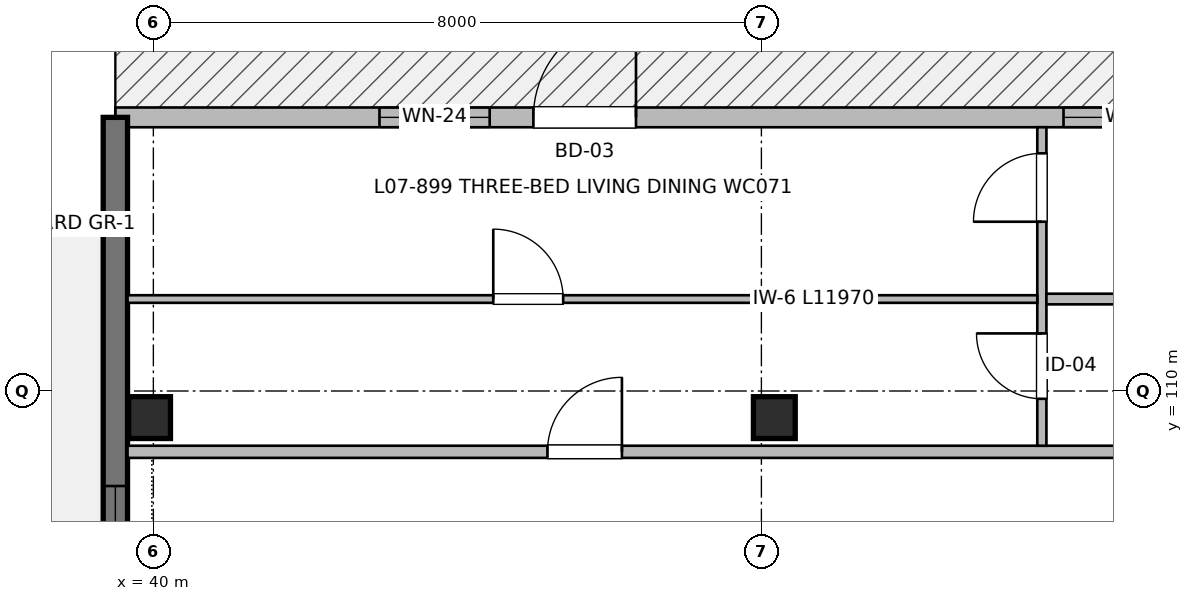
"""IFC4 building model, lengths in metres.
Left out: names, types, materials, properties, quantities, classifications, styles, units other than length and angle.
Written with IfcOpenShell. Run it as: python <this file> out.ifc"""

import sys

from ifc_helpers import new_model, si_unit, direction, frame, frame_2d, origin, origin_2d, place, context, subcontext, project, spatial, rectangle, extrude, element, fill, save


model = new_model("IFC4")
c1 = context("Model", 3, precision=1e-05, world=origin(), true_north=direction((0.0, 1.0)))
c2 = subcontext(c1, "Body", "Model", "MODEL_VIEW")
j1 = project(units=[si_unit("LENGTHUNIT", "METRE"), si_unit("PLANEANGLEUNIT", "RADIAN")], contexts=[c1])
p1 = place(None, origin())
s1 = spatial("IfcSite", under=j1, at=p1, CompositionType="ELEMENT")
p2 = place(p1, origin())
s2 = spatial("IfcBuilding", under=s1, at=p2, CompositionType="ELEMENT")
p3 = place(p2, frame((0.0, 0.0, 23.36)))
s3 = spatial("IfcBuildingStorey", under=s2, at=p3, CompositionType="ELEMENT", Elevation=23.36)
for number, where, z_axis, x_axis in (
    (1, (39.95, 109.65, 0.0), (0.0, 0.0, 1.0), (1.0, 0.0, 0.0)),
    (2, (48.17, 109.65, 0.0), (0.0, 0.0, 1.0), (1.0, 0.0, 0.0)),
):
    element("IfcColumn", number, at=place(p3, frame(where, z_axis=z_axis, x_axis=x_axis)), inside=s3, PredefinedType="COLUMN", context=c2, shape_type="SweptSolid", body=[
        extrude(rectangle(XDim=0.55, YDim=0.55, at=origin_2d()), origin(), (0.0, 0.0, 1.0), 3.2),
    ])
p4 = place(p3, frame((39.5, 113.6, 0.0), z_axis=(0.0, 0.0, 1.0), x_axis=(1.0, 0.0, 0.0)))
e3 = element("IfcWall", 3, at=p4, inside=s3, PredefinedType="SOLIDWALL", context=c2, shape_type="SweptSolid", body=[
    extrude(rectangle(XDim=42.0, YDim=0.26, at=frame_2d((21.0, 0.0))), origin(), (0.0, 0.0, 1.0), 2.98),
])
p5 = place(p4, frame((5.5, 0.0, 0.0)))
e4 = element("IfcOpeningElement", 4, at=p5, cuts=e3, PredefinedType="OPENING", context=c2, shape_type="SweptSolid", body=[
    extrude(rectangle(XDim=1.35, YDim=2.2, at=frame_2d((0.675, 1.1))), frame((0.0, 0.14, 0.0), z_axis=(0.0, -1.0, 0.0), x_axis=(1.0, 0.0, 0.0)), (0.0, 0.0, 1.0), 0.28),
])
p6 = place(p4, frame((3.475, 0.0, 0.77)))
e5 = element("IfcOpeningElement", 5, at=p6, cuts=e3, PredefinedType="OPENING", context=c2, shape_type="SweptSolid", body=[
    extrude(rectangle(XDim=1.45, YDim=1.45, at=frame_2d((0.725, 0.725))), frame((0.0, 0.14, 0.0), z_axis=(0.0, -1.0, 0.0), x_axis=(1.0, 0.0, 0.0)), (0.0, 0.0, 1.0), 0.28),
])
p7 = place(p4, frame((12.475, 0.0, 0.72)))
e6 = element("IfcOpeningElement", 6, at=p7, cuts=e3, PredefinedType="OPENING", context=c2, shape_type="SweptSolid", body=[
    extrude(rectangle(XDim=1.95, YDim=1.5, at=frame_2d((0.975, 0.75))), frame((0.0, 0.14, 0.0), z_axis=(0.0, -1.0, 0.0), x_axis=(1.0, 0.0, 0.0)), (0.0, 0.0, 1.0), 0.28),
])
p8 = place(p4, frame((21.5, 0.0, 0.67)))
e7 = element("IfcOpeningElement", 7, at=p8, cuts=e3, PredefinedType="OPENING", context=c2, shape_type="SweptSolid", body=[
    extrude(rectangle(XDim=2.6, YDim=1.55, at=frame_2d((1.3, 0.775))), frame((0.0, 0.14, 0.0), z_axis=(0.0, -1.0, 0.0), x_axis=(1.0, 0.0, 0.0)), (0.0, 0.0, 1.0), 0.28),
])
p9 = place(p4, frame((28.56, 0.0, 0.72)))
e8 = element("IfcOpeningElement", 8, at=p9, cuts=e3, PredefinedType="OPENING", context=c2, shape_type="SweptSolid", body=[
    extrude(rectangle(XDim=1.68, YDim=1.5, at=frame_2d((0.84, 0.75))), frame((0.0, 0.14, 0.0), z_axis=(0.0, -1.0, 0.0), x_axis=(1.0, 0.0, 0.0)), (0.0, 0.0, 1.0), 0.28),
])
p10 = place(p4, frame((36.9, 0.0, 0.72)))
e9 = element("IfcOpeningElement", 9, at=p10, cuts=e3, PredefinedType="OPENING", context=c2, shape_type="SweptSolid", body=[
    extrude(rectangle(XDim=1.8, YDim=1.5, at=frame_2d((0.9, 0.75))), frame((0.0, 0.14, 0.0), z_axis=(0.0, -1.0, 0.0), x_axis=(1.0, 0.0, 0.0)), (0.0, 0.0, 1.0), 0.28),
])
p11 = place(p3, frame((39.5, 100.0, 0.0), z_axis=(0.0, 0.0, 1.0), x_axis=(0.0, 1.0, 0.0)))
e10 = element("IfcWall", 10, at=p11, inside=s3, PredefinedType="SHEAR", context=c2, shape_type="SweptSolid", body=[
    extrude(rectangle(XDim=13.6, YDim=0.32, at=frame_2d((6.8, 0.0))), origin(), (0.0, 0.0, 1.0), 2.98),
])
p12 = place(p11, frame((4.9, 0.0, 0.0)))
e11 = element("IfcOpeningElement", 11, at=p12, cuts=e10, PredefinedType="OPENING", context=c2, shape_type="SweptSolid", body=[
    extrude(rectangle(XDim=1.2, YDim=2.2, at=frame_2d((0.6, 1.1))), frame((0.0, 0.17, 0.0), z_axis=(0.0, -1.0, 0.0), x_axis=(1.0, 0.0, 0.0)), (0.0, 0.0, 1.0), 0.34),
])
p13 = place(p11, frame((7.25, 0.0, 0.82)))
e12 = element("IfcOpeningElement", 12, at=p13, cuts=e10, PredefinedType="OPENING", context=c2, shape_type="SweptSolid", body=[
    extrude(rectangle(XDim=1.5, YDim=1.4, at=frame_2d((0.75, 0.7))), frame((0.0, 0.17, 0.0), z_axis=(0.0, -1.0, 0.0), x_axis=(1.0, 0.0, 0.0)), (0.0, 0.0, 1.0), 0.34),
])
p14 = place(p3, frame((39.66, 109.2, 0.0), z_axis=(0.0, 0.0, 1.0), x_axis=(1.0, 0.0, 0.0)))
e13 = element("IfcWall", 13, at=p14, inside=s3, PredefinedType="PARTITIONING", context=c2, shape_type="SweptSolid", body=[
    extrude(rectangle(XDim=41.68, YDim=0.16, at=frame_2d((20.84, 0.0))), origin(), (0.0, 0.0, 1.0), 2.935),
])
p15 = place(p14, frame((5.525, 0.0, 0.0)))
e14 = element("IfcOpeningElement", 14, at=p15, cuts=e13, PredefinedType="OPENING", context=c2, shape_type="SweptSolid", body=[
    extrude(rectangle(XDim=0.98, YDim=2.15, at=frame_2d((0.49, 1.075))), frame((0.0, 0.09, 0.0), z_axis=(0.0, -1.0, 0.0), x_axis=(1.0, 0.0, 0.0)), (0.0, 0.0, 1.0), 0.18),
])
p16 = place(p14, frame((26.455, 0.0, 0.0)))
e15 = element("IfcOpeningElement", 15, at=p16, cuts=e13, PredefinedType="OPENING", context=c2, shape_type="SweptSolid", body=[
    extrude(rectangle(XDim=0.98, YDim=2.15, at=frame_2d((0.49, 1.075))), frame((0.0, 0.09, 0.0), z_axis=(0.0, -1.0, 0.0), x_axis=(1.0, 0.0, 0.0)), (0.0, 0.0, 1.0), 0.18),
])
p17 = place(p3, frame((51.69, 109.28, 0.0), z_axis=(0.0, 0.0, 1.0), x_axis=(0.0, 1.0, 0.0)))
e16 = element("IfcWall", 16, at=p17, inside=s3, PredefinedType="PARTITIONING", context=c2, shape_type="SweptSolid", body=[
    extrude(rectangle(XDim=4.19, YDim=0.12, at=frame_2d((2.095, 0.0))), origin(), (0.0, 0.0, 1.0), 2.935),
])
p18 = place(p17, frame((0.618, 0.0, 0.0)))
e17 = element("IfcOpeningElement", 17, at=p18, cuts=e16, PredefinedType="OPENING", context=c2, shape_type="SweptSolid", body=[
    extrude(rectangle(XDim=0.86, YDim=2.1, at=frame_2d((0.43, 1.05))), frame((0.0, 0.07, 0.0), z_axis=(0.0, -1.0, 0.0), x_axis=(1.0, 0.0, 0.0)), (0.0, 0.0, 1.0), 0.14),
])
p19 = place(p17, frame((2.947, 0.0, 0.0)))
e18 = element("IfcOpeningElement", 18, at=p19, cuts=e16, PredefinedType="OPENING", context=c2, shape_type="SweptSolid", body=[
    extrude(rectangle(XDim=0.9, YDim=2.1, at=frame_2d((0.45, 1.05))), frame((0.0, 0.07, 0.0), z_axis=(0.0, -1.0, 0.0), x_axis=(1.0, 0.0, 0.0)), (0.0, 0.0, 1.0), 0.14),
])
p20 = place(p3, frame((51.75, 111.21, 0.0), z_axis=(0.0, 0.0, 1.0), x_axis=(1.0, 0.0, 0.0)))
e19 = element("IfcWall", 19, at=p20, inside=s3, PredefinedType="PARTITIONING", context=c2, shape_type="SweptSolid", body=[
    extrude(rectangle(XDim=8.66, YDim=0.14, at=frame_2d((4.33, 0.0))), origin(), (0.0, 0.0, 1.0), 2.935),
])
p21 = place(p20, frame((3.088, 0.0, 0.0)))
e20 = element("IfcOpeningElement", 20, at=p21, cuts=e19, PredefinedType="OPENING", context=c2, shape_type="SweptSolid", body=[
    extrude(rectangle(XDim=0.85, YDim=2.05, at=frame_2d((0.425, 1.025))), frame((0.0, 0.08, 0.0), z_axis=(0.0, -1.0, 0.0), x_axis=(1.0, 0.0, 0.0)), (0.0, 0.0, 1.0), 0.16),
])
p22 = place(p3, frame((39.66, 111.21, 0.0), z_axis=(0.0, 0.0, 1.0), x_axis=(1.0, 0.0, 0.0)))
e21 = element("IfcWall", 21, at=p22, inside=s3, PredefinedType="PARTITIONING", context=c2, shape_type="SweptSolid", body=[
    extrude(rectangle(XDim=11.97, YDim=0.1, at=frame_2d((5.985, 0.0))), origin(), (0.0, 0.0, 1.0), 2.935),
])
p23 = place(p22, frame((4.812, 0.0, 0.0)))
e22 = element("IfcOpeningElement", 22, at=p23, cuts=e21, PredefinedType="OPENING", context=c2, shape_type="SweptSolid", body=[
    extrude(rectangle(XDim=0.92, YDim=2.1, at=frame_2d((0.46, 1.05))), frame((0.0, 0.06, 0.0), z_axis=(0.0, -1.0, 0.0), x_axis=(1.0, 0.0, 0.0)), (0.0, 0.0, 1.0), 0.12),
])
p24 = place(p5, origin())
e23 = element("IfcDoor", 23, at=p24, inside=s3, OperationType="SINGLE_SWING_RIGHT", PredefinedType="DOOR", context=c2, shape_type="SweptSolid", body=[
    extrude(rectangle(XDim=1.35, YDim=2.2, at=frame_2d((0.675, 1.1))), frame((0.0, 0.025, 0.0), z_axis=(0.0, -1.0, 0.0), x_axis=(1.0, 0.0, 0.0)), (0.0, 0.0, 1.0), 0.05),
])
fill(e4, e23)
p25 = place(p6, origin())
e24 = element("IfcWindow", 24, at=p25, inside=s3, PartitioningType="SINGLE_PANEL", PredefinedType="WINDOW", context=c2, shape_type="SweptSolid", body=[
    extrude(rectangle(XDim=1.45, YDim=1.45, at=frame_2d((0.725, 0.725))), frame((0.0, 0.03, 0.0), z_axis=(0.0, -1.0, 0.0), x_axis=(1.0, 0.0, 0.0)), (0.0, 0.0, 1.0), 0.06),
])
fill(e5, e24)
p26 = place(p7, origin())
e25 = element("IfcWindow", 25, at=p26, inside=s3, PartitioningType="SINGLE_PANEL", PredefinedType="WINDOW", context=c2, shape_type="SweptSolid", body=[
    extrude(rectangle(XDim=1.95, YDim=1.5, at=frame_2d((0.975, 0.75))), frame((0.0, 0.03, 0.0), z_axis=(0.0, -1.0, 0.0), x_axis=(1.0, 0.0, 0.0)), (0.0, 0.0, 1.0), 0.06),
])
fill(e6, e25)
p27 = place(p13, origin())
e26 = element("IfcWindow", 26, at=p27, inside=s3, PartitioningType="SINGLE_PANEL", PredefinedType="WINDOW", context=c2, shape_type="SweptSolid", body=[
    extrude(rectangle(XDim=1.5, YDim=1.4, at=frame_2d((0.75, 0.7))), frame((0.0, 0.03, 0.0), z_axis=(0.0, -1.0, 0.0), x_axis=(1.0, 0.0, 0.0)), (0.0, 0.0, 1.0), 0.06),
])
fill(e12, e26)
p28 = place(p15, origin())
e27 = element("IfcDoor", 27, at=p28, inside=s3, OperationType="SINGLE_SWING_RIGHT", PredefinedType="DOOR", context=c2, shape_type="SweptSolid", body=[
    extrude(rectangle(XDim=0.98, YDim=2.15, at=frame_2d((0.49, 1.075))), frame((0.0, 0.025, 0.0), z_axis=(0.0, -1.0, 0.0), x_axis=(1.0, 0.0, 0.0)), (0.0, 0.0, 1.0), 0.05),
])
fill(e14, e27)
p29 = place(p23, origin())
e28 = element("IfcDoor", 28, at=p29, inside=s3, OperationType="SINGLE_SWING_LEFT", PredefinedType="DOOR", context=c2, shape_type="SweptSolid", body=[
    extrude(rectangle(XDim=0.92, YDim=2.1, at=frame_2d((0.46, 1.05))), frame((0.0, 0.025, 0.0), z_axis=(0.0, -1.0, 0.0), x_axis=(1.0, 0.0, 0.0)), (0.0, 0.0, 1.0), 0.05),
])
fill(e22, e28)
p30 = place(p18, origin())
e29 = element("IfcDoor", 29, at=p30, inside=s3, OperationType="SINGLE_SWING_RIGHT", PredefinedType="DOOR", context=c2, shape_type="SweptSolid", body=[
    extrude(rectangle(XDim=0.86, YDim=2.1, at=frame_2d((0.43, 1.05))), frame((0.0, 0.025, 0.0), z_axis=(0.0, -1.0, 0.0), x_axis=(1.0, 0.0, 0.0)), (0.0, 0.0, 1.0), 0.05),
])
fill(e17, e29)
p31 = place(p19, origin())
e30 = element("IfcDoor", 30, at=p31, inside=s3, OperationType="SINGLE_SWING_LEFT", PredefinedType="DOOR", context=c2, shape_type="SweptSolid", body=[
    extrude(rectangle(XDim=0.9, YDim=2.1, at=frame_2d((0.45, 1.05))), frame((0.0, 0.025, 0.0), z_axis=(0.0, -1.0, 0.0), x_axis=(1.0, 0.0, 0.0)), (0.0, 0.0, 1.0), 0.05),
])
fill(e18, e30)
save(model, sys.argv[1])
